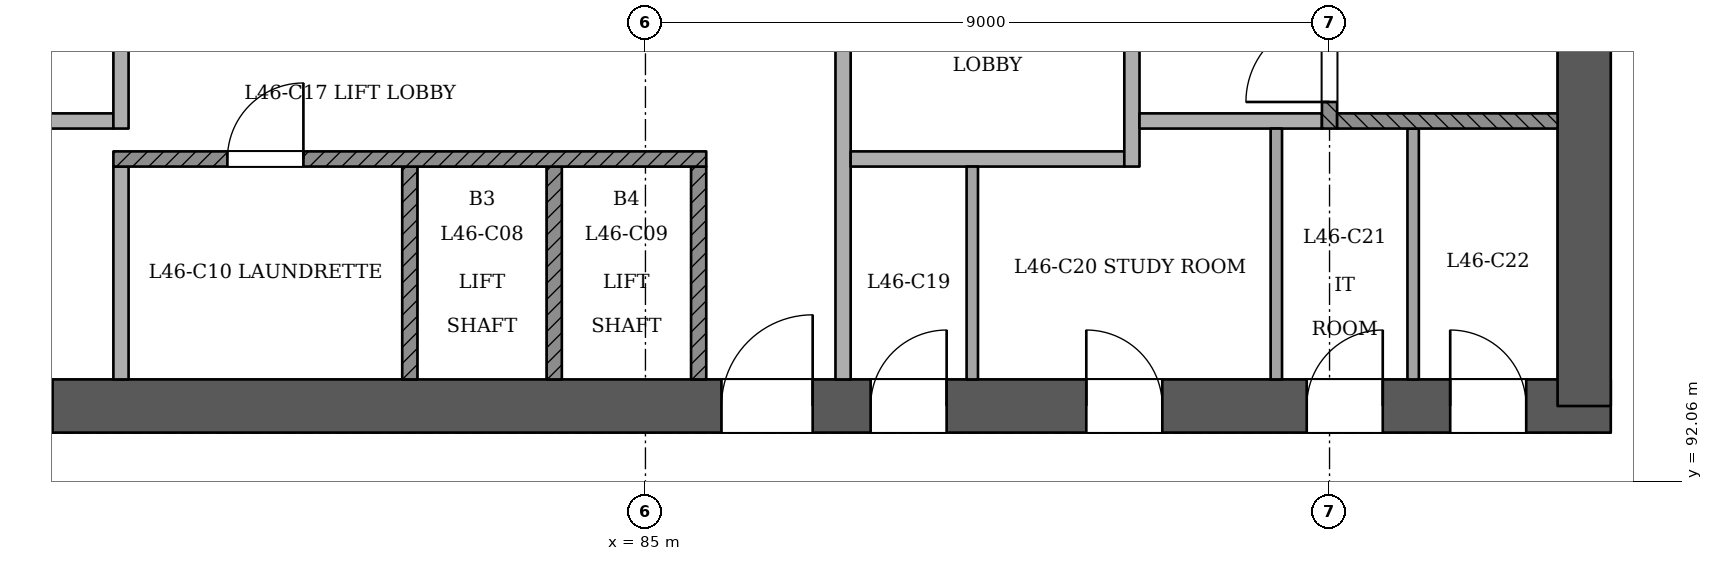
"""IFC4 building model, lengths in metres.
Left out: names, types, materials, properties, quantities, classifications, styles, units other than length and angle.
Written with IfcOpenShell. Run it as: python <this file> out.ifc"""

import sys

from ifc_helpers import new_model, si_unit, direction, frame, frame_2d, origin, place, context, subcontext, project, spatial, rectangle, extrude, element, fill, save


model = new_model("IFC4")
c1 = context("Model", 3, precision=1e-05, world=origin(), true_north=direction((0.0, 1.0)))
c2 = subcontext(c1, "Body", "Model", "MODEL_VIEW")
j1 = project(units=[si_unit("LENGTHUNIT", "METRE"), si_unit("PLANEANGLEUNIT", "RADIAN")], contexts=[c1])
p1 = place(None, origin())
s1 = spatial("IfcSite", under=j1, at=p1, CompositionType="ELEMENT")
p2 = place(p1, origin())
s2 = spatial("IfcBuilding", under=s1, at=p2, CompositionType="ELEMENT")
p3 = place(p2, frame((0.0, 0.0, 178.2)))
s3 = spatial("IfcBuildingStorey", under=s2, at=p3, CompositionType="ELEMENT", Elevation=178.2)
p4 = place(p3, frame((72.65, 93.05, 0.0), z_axis=(0.0, 0.0, 1.0), x_axis=(1.0, 0.0, 0.0)))
e1 = element("IfcWall", 1, at=p4, inside=s3, PredefinedType="SHEAR", context=c2, shape_type="SweptSolid", body=[
    extrude(rectangle(XDim=25.05, YDim=0.7, at=frame_2d((12.525, 0.0))), origin(), (0.0, 0.0, 1.0), 3.6),
])
p5 = place(p4, frame((1.15, 0.0, 0.0)))
e2 = element("IfcOpeningElement", 2, at=p5, cuts=e1, PredefinedType="OPENING", context=c2, shape_type="SweptSolid", body=[
    extrude(rectangle(XDim=1.2, YDim=2.1, at=frame_2d((0.6, 1.05))), frame((0.0, 0.36, 0.0), z_axis=(0.0, -1.0, 0.0), x_axis=(1.0, 0.0, 0.0)), (0.0, 0.0, 1.0), 0.721),
])
p6 = place(p4, frame((3.35, 0.0, 0.0)))
e3 = element("IfcOpeningElement", 3, at=p6, cuts=e1, PredefinedType="OPENING", context=c2, shape_type="SweptSolid", body=[
    extrude(rectangle(XDim=1.2, YDim=2.1, at=frame_2d((0.6, 1.05))), frame((0.0, 0.36, 0.0), z_axis=(0.0, -1.0, 0.0), x_axis=(1.0, 0.0, 0.0)), (0.0, 0.0, 1.0), 0.721),
])
p7 = place(p4, frame((13.35, 0.0, 0.0)))
e4 = element("IfcOpeningElement", 4, at=p7, cuts=e1, PredefinedType="OPENING", context=c2, shape_type="SweptSolid", body=[
    extrude(rectangle(XDim=1.2, YDim=2.1, at=frame_2d((0.6, 1.05))), frame((0.0, 0.36, 0.0), z_axis=(0.0, -1.0, 0.0), x_axis=(1.0, 0.0, 0.0)), (0.0, 0.0, 1.0), 0.721),
])
p8 = place(p4, frame((15.312, 0.0, 0.0)))
e5 = element("IfcOpeningElement", 5, at=p8, cuts=e1, PredefinedType="OPENING", context=c2, shape_type="SweptSolid", body=[
    extrude(rectangle(XDim=1.0, YDim=2.1, at=frame_2d((0.5, 1.05))), frame((0.0, 0.36, 0.0), z_axis=(0.0, -1.0, 0.0), x_axis=(1.0, 0.0, 0.0)), (0.0, 0.0, 1.0), 0.721),
])
p9 = place(p4, frame((18.15, 0.0, 0.0)))
e6 = element("IfcOpeningElement", 6, at=p9, cuts=e1, PredefinedType="OPENING", context=c2, shape_type="SweptSolid", body=[
    extrude(rectangle(XDim=1.0, YDim=2.1, at=frame_2d((0.5, 1.05))), frame((0.0, 0.36, 0.0), z_axis=(0.0, -1.0, 0.0), x_axis=(1.0, 0.0, 0.0)), (0.0, 0.0, 1.0), 0.721),
])
p10 = place(p4, frame((21.05, 0.0, 0.0)))
e7 = element("IfcOpeningElement", 7, at=p10, cuts=e1, PredefinedType="OPENING", context=c2, shape_type="SweptSolid", body=[
    extrude(rectangle(XDim=1.0, YDim=2.1, at=frame_2d((0.5, 1.05))), frame((0.0, 0.36, 0.0), z_axis=(0.0, -1.0, 0.0), x_axis=(1.0, 0.0, 0.0)), (0.0, 0.0, 1.0), 0.721),
])
p11 = place(p4, frame((22.938, 0.0, 0.0)))
e8 = element("IfcOpeningElement", 8, at=p11, cuts=e1, PredefinedType="OPENING", context=c2, shape_type="SweptSolid", body=[
    extrude(rectangle(XDim=1.0, YDim=2.1, at=frame_2d((0.5, 1.05))), frame((0.0, 0.36, 0.0), z_axis=(0.0, -1.0, 0.0), x_axis=(1.0, 0.0, 0.0)), (0.0, 0.0, 1.0), 0.721),
])
p12 = place(p3, frame((97.35, 93.05, 0.0), z_axis=(0.0, 0.0, 1.0), x_axis=(0.0, 1.0, 0.0)))
e9 = element("IfcWall", 9, at=p12, inside=s3, PredefinedType="SHEAR", context=c2, shape_type="SweptSolid", body=[
    extrude(rectangle(XDim=11.05, YDim=0.7, at=frame_2d((5.525, 0.0))), origin(), (0.0, 0.0, 1.0), 3.6),
])
p13 = place(p3, frame((78.1, 93.4, 0.0), z_axis=(0.0, 0.0, 1.0), x_axis=(0.0, 1.0, 0.0)))
e10 = element("IfcWall", 10, at=p13, inside=s3, PredefinedType="PARTITIONING", context=c2, shape_type="SweptSolid", body=[
    extrude(rectangle(XDim=2.8, YDim=0.2, at=frame_2d((1.4, 0.0))), origin(), (0.0, 0.0, 1.0), 3.15),
])
for number, where, z_axis, x_axis in (
    (11, (81.9, 93.4, 0.0), (0.0, 0.0, 1.0), (0.0, 1.0, 0.0)),
    (12, (83.8, 93.4, 0.0), (0.0, 0.0, 1.0), (0.0, 1.0, 0.0)),
    (13, (85.7, 93.4, 0.0), (0.0, 0.0, 1.0), (0.0, 1.0, 0.0)),
):
    element("IfcWall", number, at=place(p3, frame(where, z_axis=z_axis, x_axis=x_axis)), inside=s3, PredefinedType="SOLIDWALL", context=c2, shape_type="SweptSolid", body=[
        extrude(rectangle(XDim=2.8, YDim=0.2, at=frame_2d((1.4, 0.0))), origin(), (0.0, 0.0, 1.0), 3.15),
    ])
p14 = place(p3, frame((87.6, 93.4, 0.0), z_axis=(0.0, 0.0, 1.0), x_axis=(0.0, 1.0, 0.0)))
e14 = element("IfcWall", 14, at=p14, inside=s3, PredefinedType="PARTITIONING", context=c2, shape_type="SweptSolid", body=[
    extrude(rectangle(XDim=7.0, YDim=0.2, at=frame_2d((3.5, 0.0))), origin(), (0.0, 0.0, 1.0), 3.15),
])
p15 = place(p14, frame((4.45, 0.0, 0.0)))
e15 = element("IfcOpeningElement", 15, at=p15, cuts=e14, PredefinedType="OPENING", context=c2, shape_type="SweptSolid", body=[
    extrude(rectangle(XDim=1.1, YDim=2.1, at=frame_2d((0.55, 1.05))), frame((0.0, 0.11, 0.0), z_axis=(0.0, -1.0, 0.0), x_axis=(1.0, 0.0, 0.0)), (0.0, 0.0, 1.0), 0.221),
])
p16 = place(p3, frame((89.3, 93.4, 0.0), z_axis=(0.0, 0.0, 1.0), x_axis=(0.0, 1.0, 0.0)))
e16 = element("IfcWall", 16, at=p16, inside=s3, PredefinedType="PARTITIONING", context=c2, shape_type="SweptSolid", body=[
    extrude(rectangle(XDim=2.8, YDim=0.15, at=frame_2d((1.4, 0.0))), origin(), (0.0, 0.0, 1.0), 3.15),
])
for number, where, z_axis, x_axis in (
    (17, (93.3, 93.4, 0.0), (0.0, 0.0, 1.0), (0.0, 1.0, 0.0)),
    (18, (95.1, 93.4, 0.0), (0.0, 0.0, 1.0), (0.0, 1.0, 0.0)),
):
    element("IfcWall", number, at=place(p3, frame(where, z_axis=z_axis, x_axis=x_axis)), inside=s3, PredefinedType="PARTITIONING", context=c2, shape_type="SweptSolid", body=[
        extrude(rectangle(XDim=3.3, YDim=0.15, at=frame_2d((1.65, 0.0))), origin(), (0.0, 0.0, 1.0), 3.15),
    ])
p17 = place(p3, frame((78.0, 96.3, 0.0), z_axis=(0.0, 0.0, 1.0), x_axis=(1.0, 0.0, 0.0)))
e19 = element("IfcWall", 19, at=p17, inside=s3, PredefinedType="SOLIDWALL", context=c2, shape_type="SweptSolid", body=[
    extrude(rectangle(XDim=7.8, YDim=0.2, at=frame_2d((3.9, 0.0))), origin(), (0.0, 0.0, 1.0), 3.15),
])
p18 = place(p17, frame((1.5, 0.0, 0.0)))
e20 = element("IfcOpeningElement", 20, at=p18, cuts=e19, PredefinedType="OPENING", context=c2, shape_type="SweptSolid", body=[
    extrude(rectangle(XDim=1.0, YDim=2.1, at=frame_2d((0.5, 1.05))), frame((0.0, 0.11, 0.0), z_axis=(0.0, -1.0, 0.0), x_axis=(1.0, 0.0, 0.0)), (0.0, 0.0, 1.0), 0.221),
])
p19 = place(p3, frame((87.7, 96.3, 0.0), z_axis=(0.0, 0.0, 1.0), x_axis=(1.0, 0.0, 0.0)))
e21 = element("IfcWall", 21, at=p19, inside=s3, PredefinedType="PARTITIONING", context=c2, shape_type="SweptSolid", body=[
    extrude(rectangle(XDim=3.6, YDim=0.2, at=frame_2d((1.8, 0.0))), origin(), (0.0, 0.0, 1.0), 3.15),
])
p20 = place(p3, frame((91.4, 96.2, 0.0), z_axis=(0.0, 0.0, 1.0), x_axis=(0.0, 1.0, 0.0)))
e22 = element("IfcWall", 22, at=p20, inside=s3, PredefinedType="PARTITIONING", context=c2, shape_type="SweptSolid", body=[
    extrude(rectangle(XDim=4.2, YDim=0.2, at=frame_2d((2.1, 0.0))), origin(), (0.0, 0.0, 1.0), 3.15),
])
p21 = place(p20, frame((2.45, 0.0, 0.0)))
e23 = element("IfcOpeningElement", 23, at=p21, cuts=e22, PredefinedType="OPENING", context=c2, shape_type="SweptSolid", body=[
    extrude(rectangle(XDim=1.1, YDim=2.1, at=frame_2d((0.55, 1.05))), frame((0.0, 0.11, 0.0), z_axis=(0.0, -1.0, 0.0), x_axis=(1.0, 0.0, 0.0)), (0.0, 0.0, 1.0), 0.221),
])
p22 = place(p3, frame((76.1, 96.8, 0.0), z_axis=(0.0, 0.0, 1.0), x_axis=(1.0, 0.0, 0.0)))
e24 = element("IfcWall", 24, at=p22, inside=s3, PredefinedType="PARTITIONING", context=c2, shape_type="SweptSolid", body=[
    extrude(rectangle(XDim=1.9, YDim=0.2, at=frame_2d((0.95, 0.0))), origin(), (0.0, 0.0, 1.0), 3.15),
])
p23 = place(p3, frame((78.1, 96.7, 0.0), z_axis=(0.0, 0.0, 1.0), x_axis=(0.0, 1.0, 0.0)))
e25 = element("IfcWall", 25, at=p23, inside=s3, PredefinedType="PARTITIONING", context=c2, shape_type="SweptSolid", body=[
    extrude(rectangle(XDim=3.7, YDim=0.2, at=frame_2d((1.85, 0.0))), origin(), (0.0, 0.0, 1.0), 3.15),
])
p24 = place(p23, frame((1.95, 0.0, 0.0)))
e26 = element("IfcOpeningElement", 26, at=p24, cuts=e25, PredefinedType="OPENING", context=c2, shape_type="SweptSolid", body=[
    extrude(rectangle(XDim=1.1, YDim=2.1, at=frame_2d((0.55, 1.05))), frame((0.0, 0.11, 0.0), z_axis=(0.0, -1.0, 0.0), x_axis=(1.0, 0.0, 0.0)), (0.0, 0.0, 1.0), 0.221),
])
p25 = place(p3, frame((91.5, 96.8, 0.0), z_axis=(0.0, 0.0, 1.0), x_axis=(1.0, 0.0, 0.0)))
e27 = element("IfcWall", 27, at=p25, inside=s3, PredefinedType="PARTITIONING", context=c2, shape_type="SweptSolid", body=[
    extrude(rectangle(XDim=2.4, YDim=0.2, at=frame_2d((1.2, 0.0))), origin(), (0.0, 0.0, 1.0), 3.15),
])
p26 = place(p3, frame((94.0, 96.7, 0.0), z_axis=(0.0, 0.0, 1.0), x_axis=(0.0, 1.0, 0.0)))
e28 = element("IfcWall", 28, at=p26, inside=s3, PredefinedType="SOLIDWALL", context=c2, shape_type="SweptSolid", body=[
    extrude(rectangle(XDim=3.7, YDim=0.2, at=frame_2d((1.85, 0.0))), origin(), (0.0, 0.0, 1.0), 3.15),
])
p27 = place(p26, frame((0.35, 0.0, 0.0)))
e29 = element("IfcOpeningElement", 29, at=p27, cuts=e28, PredefinedType="OPENING", context=c2, shape_type="SweptSolid", body=[
    extrude(rectangle(XDim=1.1, YDim=2.1, at=frame_2d((0.55, 1.05))), frame((0.0, 0.11, 0.0), z_axis=(0.0, -1.0, 0.0), x_axis=(1.0, 0.0, 0.0)), (0.0, 0.0, 1.0), 0.221),
])
p28 = place(p3, frame((94.1, 96.8, 0.0), z_axis=(0.0, 0.0, 1.0), x_axis=(1.0, 0.0, 0.0)))
e30 = element("IfcWall", 30, at=p28, inside=s3, PredefinedType="SOLIDWALL", context=c2, shape_type="SweptSolid", body=[
    extrude(rectangle(XDim=2.9, YDim=0.2, at=frame_2d((1.45, 0.0))), origin(), (0.0, 0.0, 1.0), 3.15),
])
p29 = place(p27, origin())
e31 = element("IfcDoor", 31, at=p29, inside=s3, OperationType="SINGLE_SWING_LEFT", PredefinedType="NOTDEFINED", context=c2, shape_type="SweptSolid", body=[
    extrude(rectangle(XDim=1.1, YDim=2.1, at=frame_2d((0.55, 1.05))), frame((0.0, 0.025, 0.0), z_axis=(0.0, -1.0, 0.0), x_axis=(1.0, 0.0, 0.0)), (0.0, 0.0, 1.0), 0.05),
])
fill(e29, e31)
p30 = place(p6, origin())
e32 = element("IfcDoor", 32, at=p30, inside=s3, OperationType="SINGLE_SWING_LEFT", PredefinedType="NOTDEFINED", context=c2, shape_type="SweptSolid", body=[
    extrude(rectangle(XDim=1.2, YDim=2.1, at=frame_2d((0.6, 1.05))), frame((0.0, 0.025, 0.0), z_axis=(0.0, -1.0, 0.0), x_axis=(1.0, 0.0, 0.0)), (0.0, 0.0, 1.0), 0.05),
])
fill(e3, e32)
p31 = place(p7, origin())
e33 = element("IfcDoor", 33, at=p31, inside=s3, OperationType="SINGLE_SWING_RIGHT", PredefinedType="NOTDEFINED", context=c2, shape_type="SweptSolid", body=[
    extrude(rectangle(XDim=1.2, YDim=2.1, at=frame_2d((0.6, 1.05))), frame((0.0, 0.025, 0.0), z_axis=(0.0, -1.0, 0.0), x_axis=(1.0, 0.0, 0.0)), (0.0, 0.0, 1.0), 0.05),
])
fill(e4, e33)
p32 = place(p8, origin())
e34 = element("IfcDoor", 34, at=p32, inside=s3, OperationType="SINGLE_SWING_RIGHT", PredefinedType="NOTDEFINED", context=c2, shape_type="SweptSolid", body=[
    extrude(rectangle(XDim=1.0, YDim=2.1, at=frame_2d((0.5, 1.05))), frame((0.0, 0.025, 0.0), z_axis=(0.0, -1.0, 0.0), x_axis=(1.0, 0.0, 0.0)), (0.0, 0.0, 1.0), 0.05),
])
fill(e5, e34)
p33 = place(p9, origin())
e35 = element("IfcDoor", 35, at=p33, inside=s3, OperationType="SINGLE_SWING_LEFT", PredefinedType="NOTDEFINED", context=c2, shape_type="SweptSolid", body=[
    extrude(rectangle(XDim=1.0, YDim=2.1, at=frame_2d((0.5, 1.05))), frame((0.0, 0.025, 0.0), z_axis=(0.0, -1.0, 0.0), x_axis=(1.0, 0.0, 0.0)), (0.0, 0.0, 1.0), 0.05),
])
fill(e6, e35)
p34 = place(p10, origin())
e36 = element("IfcDoor", 36, at=p34, inside=s3, OperationType="SINGLE_SWING_RIGHT", PredefinedType="NOTDEFINED", context=c2, shape_type="SweptSolid", body=[
    extrude(rectangle(XDim=1.0, YDim=2.1, at=frame_2d((0.5, 1.05))), frame((0.0, 0.025, 0.0), z_axis=(0.0, -1.0, 0.0), x_axis=(1.0, 0.0, 0.0)), (0.0, 0.0, 1.0), 0.05),
])
fill(e7, e36)
p35 = place(p11, origin())
e37 = element("IfcDoor", 37, at=p35, inside=s3, OperationType="SINGLE_SWING_LEFT", PredefinedType="NOTDEFINED", context=c2, shape_type="SweptSolid", body=[
    extrude(rectangle(XDim=1.0, YDim=2.1, at=frame_2d((0.5, 1.05))), frame((0.0, 0.025, 0.0), z_axis=(0.0, -1.0, 0.0), x_axis=(1.0, 0.0, 0.0)), (0.0, 0.0, 1.0), 0.05),
])
fill(e8, e37)
p36 = place(p18, origin())
e38 = element("IfcDoor", 38, at=p36, inside=s3, OperationType="SINGLE_SWING_RIGHT", PredefinedType="NOTDEFINED", context=c2, shape_type="SweptSolid", body=[
    extrude(rectangle(XDim=1.0, YDim=2.1, at=frame_2d((0.5, 1.05))), frame((0.0, 0.025, 0.0), z_axis=(0.0, -1.0, 0.0), x_axis=(1.0, 0.0, 0.0)), (0.0, 0.0, 1.0), 0.05),
])
fill(e20, e38)
save(model, sys.argv[1])
